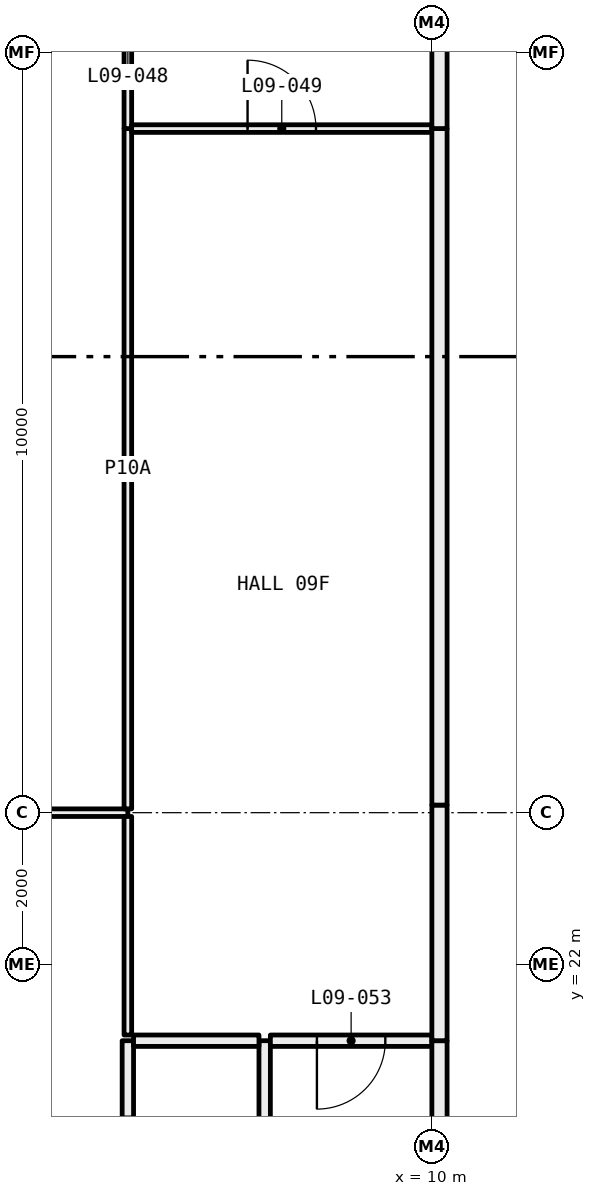
"""IFC4 building model, lengths in metres.
Left out: names, types, materials, properties, quantities, classifications, styles, units other than length and angle.
Written with IfcOpenShell. Run it as: python <this file> out.ifc"""

import sys

from ifc_helpers import new_model, si_unit, direction, frame, frame_2d, origin, place, context, subcontext, project, spatial, rectangle, extrude, element, fill, save


model = new_model("IFC4")
c1 = context("Model", 3, precision=1e-05, world=origin(), true_north=direction((0.0, 1.0)))
c2 = subcontext(c1, "Body", "Model", "MODEL_VIEW")
j1 = project(units=[si_unit("LENGTHUNIT", "METRE"), si_unit("PLANEANGLEUNIT", "RADIAN")], contexts=[c1])
p1 = place(None, origin())
s1 = spatial("IfcSite", under=j1, at=p1, CompositionType="ELEMENT")
p2 = place(p1, origin())
s2 = spatial("IfcBuilding", under=s1, at=p2, CompositionType="ELEMENT")
p3 = place(p2, frame((0.0, 0.0, 43.8)))
s3 = spatial("IfcBuildingStorey", under=s2, at=p3, CompositionType="ELEMENT", Elevation=43.8)
p4 = place(p3, frame((6.0, 24.0, 0.0), z_axis=(0.0, 0.0, 1.0), x_axis=(-1.0, 0.0, 0.0)))
e1 = element("IfcWall", 1, at=p4, inside=s3, PredefinedType="PARTITIONING", context=c2, shape_type="SweptSolid", body=[
    extrude(rectangle(XDim=5.28, YDim=0.1, at=frame_2d((2.64, 0.0))), origin(), (0.0, 0.0, 1.0), 2.45),
])
p5 = place(p4, frame((2.19, 0.0, 0.0)))
e2 = element("IfcOpeningElement", 2, at=p5, cuts=e1, PredefinedType="OPENING", context=c2, shape_type="SweptSolid", body=[
    extrude(rectangle(XDim=0.9, YDim=2.1, at=frame_2d((0.45, 1.05))), frame((0.0, 0.06, 0.0), z_axis=(0.0, -1.0, 0.0), x_axis=(1.0, 0.0, 0.0)), (0.0, 0.0, 1.0), 0.12),
])
p6 = place(p3, frame((6.0, 18.1, 0.0), z_axis=(0.0, 0.0, 1.0), x_axis=(0.0, 1.0, 0.0)))
e3 = element("IfcWall", 3, at=p6, inside=s3, PredefinedType="PARTITIONING", context=c2, shape_type="SweptSolid", body=[
    extrude(rectangle(XDim=2.9, YDim=0.15, at=frame_2d((1.45, 0.0))), origin(), (0.0, 0.0, 1.0), 3.05),
])
p7 = place(p6, frame((1.0, 0.0, 0.0)))
e4 = element("IfcOpeningElement", 4, at=p7, cuts=e3, PredefinedType="OPENING", context=c2, shape_type="SweptSolid", body=[
    extrude(rectangle(XDim=0.9, YDim=2.1, at=frame_2d((0.45, 1.05))), frame((0.0, 0.085, 0.0), z_axis=(0.0, -1.0, 0.0), x_axis=(1.0, 0.0, 0.0)), (0.0, 0.0, 1.0), 0.17),
])
p8 = place(p3, frame((6.0, 21.075, 0.0), z_axis=(0.0, 0.0, 1.0), x_axis=(0.0, 1.0, 0.0)))
e5 = element("IfcWall", 5, at=p8, inside=s3, PredefinedType="PARTITIONING", context=c2, shape_type="SweptSolid", body=[
    extrude(rectangle(XDim=2.875, YDim=0.1, at=frame_2d((1.438, 0.0))), origin(), (0.0, 0.0, 1.0), 2.45),
])
p9 = place(p3, frame((6.0, 24.05, 0.0), z_axis=(0.0, 0.0, 1.0), x_axis=(0.0, 1.0, 0.0)))
e6 = element("IfcWall", 6, at=p9, inside=s3, PredefinedType="PARTITIONING", context=c2, shape_type="SweptSolid", body=[
    extrude(rectangle(XDim=8.95, YDim=0.1, at=frame_2d((4.475, 0.0))), origin(), (0.0, 0.0, 1.0), 2.45),
])
p10 = place(p3, frame((6.0, 33.0, 0.0), z_axis=(0.0, 0.0, 1.0), x_axis=(0.0, 1.0, 0.0)))
e7 = element("IfcWall", 7, at=p10, inside=s3, PredefinedType="PARTITIONING", context=c2, shape_type="SweptSolid", body=[
    extrude(rectangle(XDim=2.95, YDim=0.1, at=frame_2d((1.475, 0.0))), origin(), (0.0, 0.0, 1.0), 2.45),
])
p11 = place(p10, frame((1.025, 0.0, 0.0)))
e8 = element("IfcOpeningElement", 8, at=p11, cuts=e7, PredefinedType="OPENING", context=c2, shape_type="SweptSolid", body=[
    extrude(rectangle(XDim=0.9, YDim=2.1, at=frame_2d((0.45, 1.05))), frame((0.0, 0.06, 0.0), z_axis=(0.0, -1.0, 0.0), x_axis=(1.0, 0.0, 0.0)), (0.0, 0.0, 1.0), 0.12),
])
p12 = place(p3, frame((7.8, 18.1, 0.0), z_axis=(0.0, 0.0, 1.0), x_axis=(0.0, 1.0, 0.0)))
e9 = element("IfcWall", 9, at=p12, inside=s3, PredefinedType="PARTITIONING", context=c2, shape_type="SweptSolid", body=[
    extrude(rectangle(XDim=2.9, YDim=0.15, at=frame_2d((1.45, 0.0))), origin(), (0.0, 0.0, 1.0), 3.05),
])
p13 = place(p3, frame((7.725, 21.0, 0.0), z_axis=(0.0, 0.0, 1.0), x_axis=(-1.0, 0.0, 0.0)))
e10 = element("IfcWall", 10, at=p13, inside=s3, PredefinedType="PARTITIONING", context=c2, shape_type="SweptSolid", body=[
    extrude(rectangle(XDim=1.65, YDim=0.15, at=frame_2d((0.825, 0.0))), origin(), (0.0, 0.0, 1.0), 3.05),
])
p14 = place(p3, frame((10.0, 21.0, 0.0), z_axis=(0.0, 0.0, 1.0), x_axis=(-1.0, 0.0, 0.0)))
e11 = element("IfcWall", 11, at=p14, inside=s3, PredefinedType="PARTITIONING", context=c2, shape_type="SweptSolid", body=[
    extrude(rectangle(XDim=2.125, YDim=0.15, at=frame_2d((1.062, 0.0))), origin(), (0.0, 0.0, 1.0), 3.05),
])
p15 = place(p14, frame((0.613, 0.0, 0.0)))
e12 = element("IfcOpeningElement", 12, at=p15, cuts=e11, PredefinedType="OPENING", context=c2, shape_type="SweptSolid", body=[
    extrude(rectangle(XDim=0.9, YDim=2.1, at=frame_2d((0.45, 1.05))), frame((0.0, 0.085, 0.0), z_axis=(0.0, -1.0, 0.0), x_axis=(1.0, 0.0, 0.0)), (0.0, 0.0, 1.0), 0.17),
])
p16 = place(p3, frame((10.1, 18.1, 0.0), z_axis=(0.0, 0.0, 1.0), x_axis=(0.0, 1.0, 0.0)))
e13 = element("IfcWall", 13, at=p16, inside=s3, PredefinedType="PARTITIONING", context=c2, shape_type="SweptSolid", body=[
    extrude(rectangle(XDim=2.9, YDim=0.2, at=frame_2d((1.45, 0.0))), origin(), (0.0, 0.0, 1.0), 3.05),
])
p17 = place(p3, frame((10.0, 33.0, 0.0), z_axis=(0.0, 0.0, 1.0), x_axis=(-1.0, 0.0, 0.0)))
e14 = element("IfcWall", 14, at=p17, inside=s3, PredefinedType="PARTITIONING", context=c2, shape_type="SweptSolid", body=[
    extrude(rectangle(XDim=3.95, YDim=0.1, at=frame_2d((1.975, 0.0))), origin(), (0.0, 0.0, 1.0), 3.05),
])
p18 = place(p17, frame((1.525, 0.0, 0.0)))
e15 = element("IfcOpeningElement", 15, at=p18, cuts=e14, PredefinedType="OPENING", context=c2, shape_type="SweptSolid", body=[
    extrude(rectangle(XDim=0.9, YDim=2.1, at=frame_2d((0.45, 1.05))), frame((0.0, 0.06, 0.0), z_axis=(0.0, -1.0, 0.0), x_axis=(1.0, 0.0, 0.0)), (0.0, 0.0, 1.0), 0.12),
])
p19 = place(p3, frame((10.1, 21.0, 0.0), z_axis=(0.0, 0.0, 1.0), x_axis=(0.0, 1.0, 0.0)))
e16 = element("IfcWall", 16, at=p19, inside=s3, PredefinedType="PARTITIONING", context=c2, shape_type="SweptSolid", body=[
    extrude(rectangle(XDim=3.1, YDim=0.2, at=frame_2d((1.55, 0.0))), origin(), (0.0, 0.0, 1.0), 2.45),
])
p20 = place(p3, frame((10.1, 24.1, 0.0), z_axis=(0.0, 0.0, 1.0), x_axis=(0.0, 1.0, 0.0)))
e17 = element("IfcWall", 17, at=p20, inside=s3, PredefinedType="PARTITIONING", context=c2, shape_type="SweptSolid", body=[
    extrude(rectangle(XDim=8.9, YDim=0.2, at=frame_2d((4.45, 0.0))), origin(), (0.0, 0.0, 1.0), 3.05),
])
p21 = place(p3, frame((10.1, 33.0, 0.0), z_axis=(0.0, 0.0, 1.0), x_axis=(0.0, 1.0, 0.0)))
e18 = element("IfcWall", 18, at=p21, inside=s3, PredefinedType="PARTITIONING", context=c2, shape_type="SweptSolid", body=[
    extrude(rectangle(XDim=3.1, YDim=0.2, at=frame_2d((1.55, 0.0))), origin(), (0.0, 0.0, 1.0), 2.45),
])
p22 = place(p21, frame((1.05, 0.0, 0.0)))
e19 = element("IfcOpeningElement", 19, at=p22, cuts=e18, PredefinedType="OPENING", context=c2, shape_type="SweptSolid", body=[
    extrude(rectangle(XDim=1.0, YDim=2.1, at=frame_2d((0.5, 1.05))), frame((0.0, 0.11, 0.0), z_axis=(0.0, -1.0, 0.0), x_axis=(1.0, 0.0, 0.0)), (0.0, 0.0, 1.0), 0.22),
])
p23 = place(p18, frame((0.9, 0.0, 0.0), x_axis=(-1.0, 0.0, 0.0)))
e20 = element("IfcDoor", 20, at=p23, inside=s3, OperationType="SINGLE_SWING_RIGHT", PredefinedType="DOOR", context=c2, shape_type="SweptSolid", body=[
    extrude(rectangle(XDim=0.9, YDim=2.1, at=frame_2d((0.45, 1.05))), frame((0.0, 0.025, 0.0), z_axis=(0.0, -1.0, 0.0), x_axis=(1.0, 0.0, 0.0)), (0.0, 0.0, 1.0), 0.05),
])
fill(e15, e20)
p24 = place(p15, origin())
e21 = element("IfcDoor", 21, at=p24, inside=s3, OperationType="SINGLE_SWING_LEFT", PredefinedType="DOOR", context=c2, shape_type="SweptSolid", body=[
    extrude(rectangle(XDim=0.9, YDim=2.1, at=frame_2d((0.45, 1.05))), frame((0.0, 0.025, 0.0), z_axis=(0.0, -1.0, 0.0), x_axis=(1.0, 0.0, 0.0)), (0.0, 0.0, 1.0), 0.05),
])
fill(e12, e21)
save(model, sys.argv[1])
